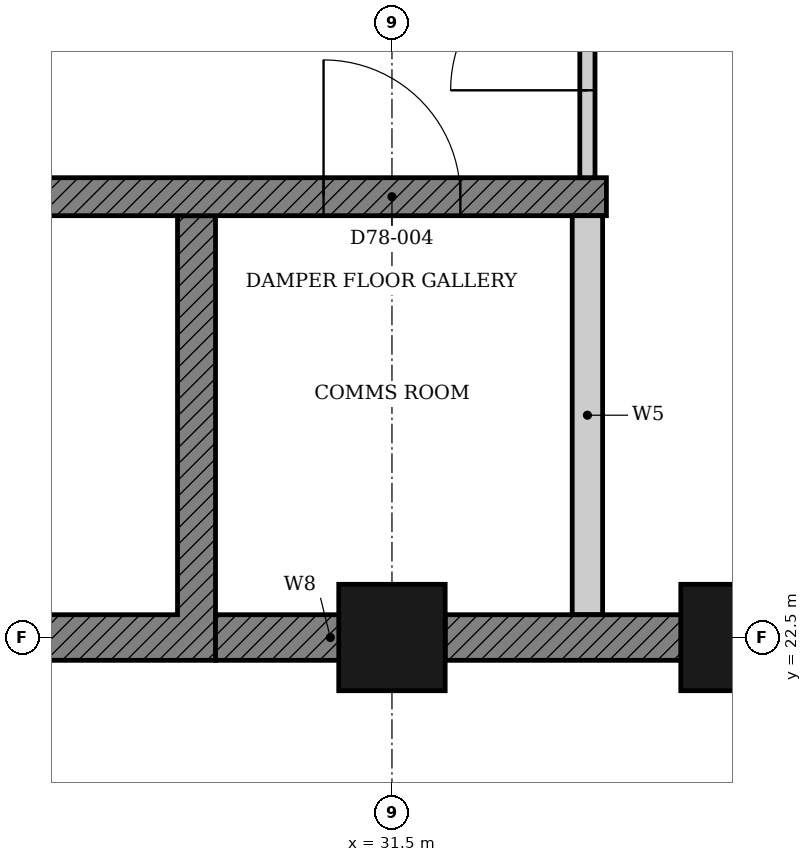
"""IFC4 building model, lengths in metres.
Left out: names, types, materials, properties, quantities, classifications, styles, units other than length and angle.
Written with IfcOpenShell. Run it as: python <this file> out.ifc"""

import sys

from ifc_helpers import new_model, si_unit, direction, frame, frame_2d, origin, origin_2d, place, context, subcontext, project, spatial, polyline, rectangle, hollow_rectangle, outline, extrude, element, fill, save


model = new_model("IFC4")
c1 = context("Model", 3, precision=1e-05, world=origin(), true_north=direction((0.0, 1.0)))
c2 = subcontext(c1, "Body", "Model", "MODEL_VIEW")
j1 = project(units=[si_unit("LENGTHUNIT", "METRE"), si_unit("PLANEANGLEUNIT", "RADIAN")], contexts=[c1])
p1 = place(None, origin())
s1 = spatial("IfcSite", under=j1, at=p1, CompositionType="ELEMENT")
p2 = place(p1, origin())
s2 = spatial("IfcBuilding", under=s1, at=p2, CompositionType="ELEMENT")
p3 = place(p2, frame((0.0, 0.0, 305.6)))
s3 = spatial("IfcBuildingStorey", under=s2, at=p3, CompositionType="ELEMENT", Elevation=305.6)
for number, where, z_axis, x_axis in (
    (1, (31.5, 22.5, -0.5), (0.0, 0.0, 1.0), (1.0, 0.0, 0.0)),
    (2, (33.75, 22.5, -0.5), (0.0, 0.0, 1.0), (1.0, 0.0, 0.0)),
):
    element("IfcColumn", number, at=place(p3, frame(where, z_axis=z_axis, x_axis=x_axis)), inside=s3, PredefinedType="COLUMN", context=c2, shape_type="SweptSolid", body=[
        extrude(hollow_rectangle(XDim=0.7, YDim=0.7, WallThickness=0.022, at=origin_2d()), origin(), (0.0, 0.0, 1.0), 6.488),
    ])
p4 = place(p3, origin())
e3 = element("IfcWall", 3, at=p4, inside=s3, PredefinedType="SHEAR", context=c2, shape_type="SweptSolid", body=[
    extrude(outline(polyline([(27.518, 22.35), (30.339, 22.35), (30.339, 25.275), (30.089, 25.275), (30.089, 22.65), (27.768, 22.65), (27.768, 25.275), (27.518, 25.275), (27.518, 22.35)])), origin(), (0.0, 0.0, 1.0), 6.9),
])
p5 = place(p3, frame((30.339, 22.5, 0.0), z_axis=(0.0, 0.0, 1.0), x_axis=(1.0, 0.0, 0.0)))
e4 = element("IfcWall", 4, at=p5, inside=s3, PredefinedType="SHEAR", context=c2, shape_type="SweptSolid", body=[
    extrude(rectangle(XDim=1.511, YDim=0.3, at=frame_2d((0.755, 0.0))), origin(), (0.0, 0.0, 1.0), 6.9),
])
p6 = place(p3, frame((22.375, 25.4, 0.0), z_axis=(0.0, 0.0, 1.0), x_axis=(1.0, 0.0, 0.0)))
e5 = element("IfcWall", 5, at=p6, inside=s3, PredefinedType="SHEAR", context=c2, shape_type="SweptSolid", body=[
    extrude(rectangle(XDim=10.536, YDim=0.25, at=frame_2d((5.268, 0.0))), origin(), (0.0, 0.0, 1.0), 6.9),
])
p7 = place(p6, frame((0.861, 0.0, 0.0)))
e6 = element("IfcOpeningElement", 6, at=p7, cuts=e5, PredefinedType="OPENING", context=c2, shape_type="SweptSolid", body=[
    extrude(rectangle(XDim=1.1, YDim=2.1, at=frame_2d((0.55, 1.05))), frame((0.0, 0.135, 0.0), z_axis=(0.0, -1.0, 0.0), x_axis=(1.0, 0.0, 0.0)), (0.0, 0.0, 1.0), 0.27),
])
p8 = place(p6, frame((3.532, 0.0, 0.0)))
e7 = element("IfcOpeningElement", 7, at=p8, cuts=e5, PredefinedType="OPENING", context=c2, shape_type="SweptSolid", body=[
    extrude(rectangle(XDim=0.9, YDim=2.1, at=frame_2d((0.45, 1.05))), frame((0.0, 0.135, 0.0), z_axis=(0.0, -1.0, 0.0), x_axis=(1.0, 0.0, 0.0)), (0.0, 0.0, 1.0), 0.27),
])
p9 = place(p6, frame((8.675, 0.0, 0.0)))
e8 = element("IfcOpeningElement", 8, at=p9, cuts=e5, PredefinedType="OPENING", context=c2, shape_type="SweptSolid", body=[
    extrude(rectangle(XDim=0.9, YDim=2.1, at=frame_2d((0.45, 1.05))), frame((0.0, 0.135, 0.0), z_axis=(0.0, -1.0, 0.0), x_axis=(1.0, 0.0, 0.0)), (0.0, 0.0, 1.0), 0.27),
])
p10 = place(p3, frame((32.786, 22.65, 0.0), z_axis=(0.0, 0.0, 1.0), x_axis=(0.0, 1.0, 0.0)))
e9 = element("IfcWall", 9, at=p10, inside=s3, PredefinedType="PARTITIONING", context=c2, shape_type="SweptSolid", body=[
    extrude(rectangle(XDim=2.625, YDim=0.2, at=frame_2d((1.312, 0.0))), origin(), (0.0, 0.0, 1.0), 6.9),
])
p11 = place(p3, frame((32.786, 25.525, 0.0), z_axis=(0.0, 0.0, 1.0), x_axis=(0.0, 1.0, 0.0)))
e10 = element("IfcWall", 10, at=p11, inside=s3, PredefinedType="PARTITIONING", context=c2, shape_type="SweptSolid", body=[
    extrude(rectangle(XDim=2.95, YDim=0.1, at=frame_2d((1.475, 0.0))), origin(), (0.0, 0.0, 1.0), 6.9),
])
p12 = place(p11, frame((0.575, 0.0, 0.0)))
e11 = element("IfcOpeningElement", 11, at=p12, cuts=e10, PredefinedType="OPENING", context=c2, shape_type="SweptSolid", body=[
    extrude(rectangle(XDim=1.8, YDim=2.1, at=frame_2d((0.9, 1.05))), frame((0.0, 0.06, 0.0), z_axis=(0.0, -1.0, 0.0), x_axis=(1.0, 0.0, 0.0)), (0.0, 0.0, 1.0), 0.12),
])
p13 = place(p3, frame((31.85, 22.5, 0.0), z_axis=(0.0, 0.0, 1.0), x_axis=(1.0, 0.0, 0.0)))
e12 = element("IfcWall", 12, at=p13, inside=s3, PredefinedType="SHEAR", context=c2, shape_type="SweptSolid", body=[
    extrude(rectangle(XDim=8.4, YDim=0.3, at=frame_2d((4.2, 0.0))), origin(), (0.0, 0.0, 1.0), 6.9),
])
p14 = place(p13, frame((6.464, 0.0, 0.0)))
e13 = element("IfcOpeningElement", 13, at=p14, cuts=e12, PredefinedType="OPENING", context=c2, shape_type="SweptSolid", body=[
    extrude(rectangle(XDim=1.8, YDim=2.1, at=frame_2d((0.9, 1.05))), frame((0.0, 0.16, 0.0), z_axis=(0.0, -1.0, 0.0), x_axis=(1.0, 0.0, 0.0)), (0.0, 0.0, 1.0), 0.32),
])
p15 = place(p9, origin())
e14 = element("IfcDoor", 14, at=p15, inside=s3, OperationType="SINGLE_SWING_LEFT", PredefinedType="DOOR", context=c2, shape_type="SweptSolid", body=[
    extrude(rectangle(XDim=0.9, YDim=2.1, at=frame_2d((0.45, 1.05))), frame((0.0, 0.025, 0.0), z_axis=(0.0, -1.0, 0.0), x_axis=(1.0, 0.0, 0.0)), (0.0, 0.0, 1.0), 0.05),
])
fill(e8, e14)
p16 = place(p12, origin())
e15 = element("IfcDoor", 15, at=p16, inside=s3, OperationType="DOUBLE_DOOR_SINGLE_SWING", PredefinedType="DOOR", context=c2, shape_type="SweptSolid", body=[
    extrude(rectangle(XDim=1.8, YDim=2.1, at=frame_2d((0.9, 1.05))), frame((0.0, 0.025, 0.0), z_axis=(0.0, -1.0, 0.0), x_axis=(1.0, 0.0, 0.0)), (0.0, 0.0, 1.0), 0.05),
])
fill(e11, e15)
save(model, sys.argv[1])
